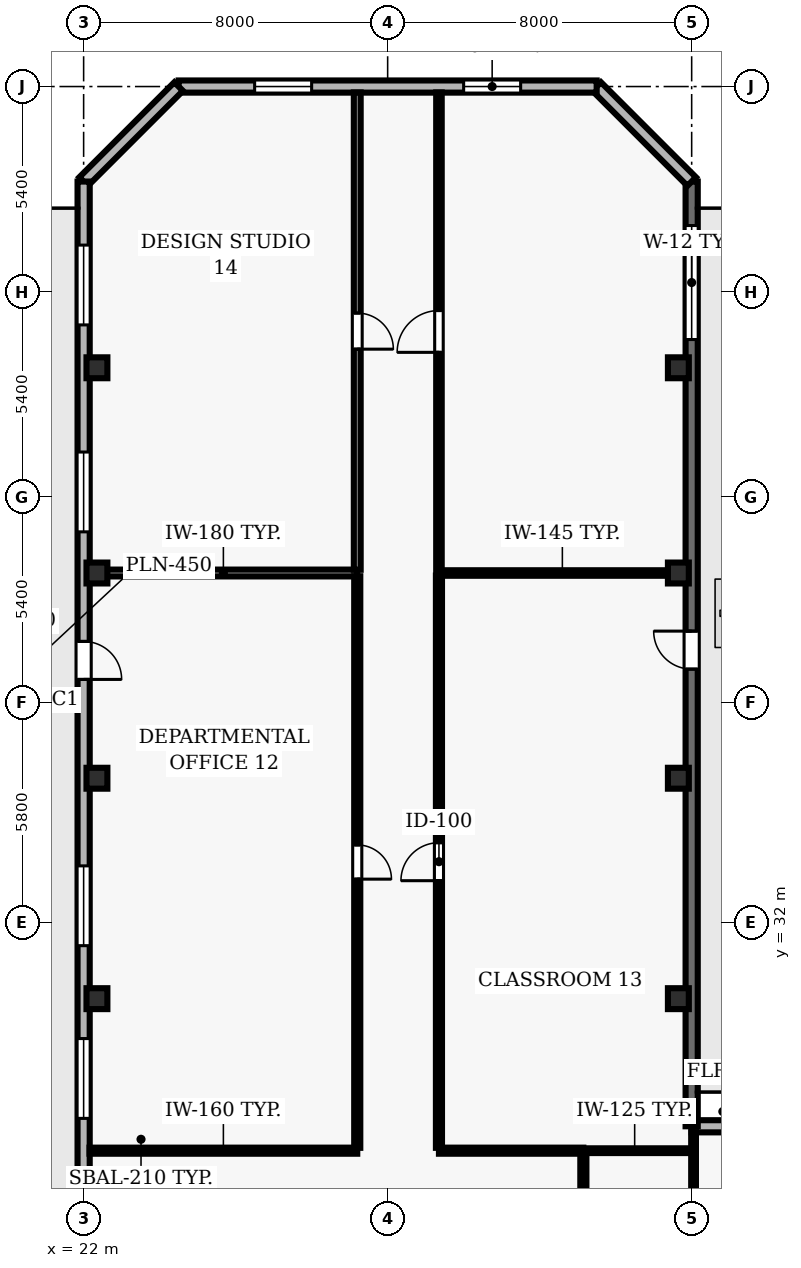
"""IFC4 building model, lengths in metres.
Left out: names, types, materials, properties, quantities, classifications, styles, units other than length and angle.
Written with IfcOpenShell. Run it as: python <this file> out.ifc"""

import sys

from ifc_helpers import new_model, si_unit, direction, frame, frame_2d, origin, origin_2d, place, context, subcontext, project, spatial, rectangle, hollow_rectangle, extrude, element, fill, save


model = new_model("IFC4")
c1 = context("Model", 3, precision=1e-05, world=origin(), true_north=direction((0.0, 1.0)))
c2 = subcontext(c1, "Body", "Model", "MODEL_VIEW")
j1 = project(units=[si_unit("LENGTHUNIT", "METRE"), si_unit("PLANEANGLEUNIT", "RADIAN")], contexts=[c1])
p1 = place(None, origin())
s1 = spatial("IfcSite", under=j1, at=p1, CompositionType="ELEMENT")
p2 = place(p1, origin())
s2 = spatial("IfcBuilding", under=s1, at=p2, CompositionType="ELEMENT")
p3 = place(p2, frame((0.0, 0.0, 66.1)))
s3 = spatial("IfcBuildingStorey", under=s2, at=p3, CompositionType="ELEMENT", Elevation=66.1)
for number, where, z_axis, x_axis in (
    (1, (22.35, 30.0, 0.0), (0.0, 0.0, 1.0), (1.0, 0.0, 0.0)),
    (2, (37.65, 30.0, 0.0), (0.0, 0.0, 1.0), (1.0, 0.0, 0.0)),
    (3, (22.35, 35.8, 0.0), (0.0, 0.0, 1.0), (1.0, 0.0, 0.0)),
    (4, (37.65, 35.8, 0.0), (0.0, 0.0, 1.0), (1.0, 0.0, 0.0)),
    (5, (22.35, 41.2, 0.0), (0.0, 0.0, 1.0), (1.0, 0.0, 0.0)),
    (6, (37.65, 41.2, 0.0), (0.0, 0.0, 1.0), (1.0, 0.0, 0.0)),
    (7, (22.35, 46.6, 0.0), (0.0, 0.0, 1.0), (1.0, 0.0, 0.0)),
    (8, (37.65, 46.6, 0.0), (0.0, 0.0, 1.0), (1.0, 0.0, 0.0)),
):
    element("IfcColumn", number, at=place(p3, frame(where, z_axis=z_axis, x_axis=x_axis)), inside=s3, PredefinedType="COLUMN", context=c2, shape_type="SweptSolid", body=[
        extrude(hollow_rectangle(XDim=0.55, YDim=0.55, WallThickness=0.025, at=origin_2d()), origin(), (0.0, 0.0, 1.0), 3.9),
    ])
p4 = place(p3, frame((49.95, 26.642, 0.0), z_axis=(0.0, 0.0, 1.0), x_axis=(-1.0, 0.0, 0.0)))
e9 = element("IfcWall", 9, at=p4, inside=s3, PredefinedType="SOLIDWALL", context=c2, shape_type="SweptSolid", body=[
    extrude(rectangle(XDim=11.95, YDim=0.32, at=frame_2d((5.975, 0.0))), origin(), (0.0, 0.0, 1.0), 3.69),
])
p5 = place(p4, frame((1.788, 0.0, 0.9)))
e10 = element("IfcOpeningElement", 10, at=p5, cuts=e9, PredefinedType="OPENING", context=c2, shape_type="SweptSolid", body=[
    extrude(rectangle(XDim=2.4, YDim=2.2, at=frame_2d((1.2, 1.1))), frame((0.0, 0.17, 0.0), z_axis=(0.0, -1.0, 0.0), x_axis=(1.0, 0.0, 0.0)), (0.0, 0.0, 1.0), 0.34),
])
p6 = place(p4, frame((7.763, 0.0, 0.9)))
e11 = element("IfcOpeningElement", 11, at=p6, cuts=e9, PredefinedType="OPENING", context=c2, shape_type="SweptSolid", body=[
    extrude(rectangle(XDim=2.4, YDim=2.2, at=frame_2d((1.2, 1.1))), frame((0.0, 0.17, 0.0), z_axis=(0.0, -1.0, 0.0), x_axis=(1.0, 0.0, 0.0)), (0.0, 0.0, 1.0), 0.34),
])
p7 = place(p3, frame((38.0, 26.642, 0.0), z_axis=(0.0, 0.0, 1.0), x_axis=(0.0, 1.0, 0.0)))
e12 = element("IfcWall", 12, at=p7, inside=s3, PredefinedType="SOLIDWALL", context=c2, shape_type="SweptSolid", body=[
    extrude(rectangle(XDim=24.858, YDim=0.32, at=frame_2d((12.429, 0.0))), origin(), (0.0, 0.0, 1.0), 3.69),
])
p8 = place(p7, frame((12.029, 0.0, 0.0)))
e13 = element("IfcOpeningElement", 13, at=p8, cuts=e12, PredefinedType="OPENING", context=c2, shape_type="SweptSolid", body=[
    extrude(rectangle(XDim=1.0, YDim=2.2, at=frame_2d((0.5, 1.1))), frame((0.0, 0.17, 0.0), z_axis=(0.0, -1.0, 0.0), x_axis=(1.0, 0.0, 0.0)), (0.0, 0.0, 1.0), 0.34),
])
p9 = place(p7, frame((20.701, 0.0, 0.9)))
e14 = element("IfcOpeningElement", 14, at=p9, cuts=e12, PredefinedType="OPENING", context=c2, shape_type="SweptSolid", body=[
    extrude(rectangle(XDim=3.0, YDim=2.2, at=frame_2d((1.5, 1.1))), frame((0.0, 0.17, 0.0), z_axis=(0.0, -1.0, 0.0), x_axis=(1.0, 0.0, 0.0)), (0.0, 0.0, 1.0), 0.34),
])
p10 = place(p3, frame((38.0, 51.5, 0.0), z_axis=(0.0, 0.0, 1.0), x_axis=(-0.707106781187, 0.707106781187, 0.0)))
e15 = element("IfcWall", 15, at=p10, inside=s3, PredefinedType="SOLIDWALL", context=c2, shape_type="SweptSolid", body=[
    extrude(rectangle(XDim=3.536, YDim=0.32, at=frame_2d((1.768, 0.0))), origin(), (0.0, 0.0, 1.0), 3.69),
])
p11 = place(p3, frame((35.5, 54.0, 0.0), z_axis=(0.0, 0.0, 1.0), x_axis=(-1.0, 0.0, 0.0)))
e16 = element("IfcWall", 16, at=p11, inside=s3, PredefinedType="SOLIDWALL", context=c2, shape_type="SweptSolid", body=[
    extrude(rectangle(XDim=11.0, YDim=0.32, at=frame_2d((5.5, 0.0))), origin(), (0.0, 0.0, 1.0), 3.69),
])
p12 = place(p11, frame((2.0, 0.0, 0.9)))
e17 = element("IfcOpeningElement", 17, at=p12, cuts=e16, PredefinedType="OPENING", context=c2, shape_type="SweptSolid", body=[
    extrude(rectangle(XDim=1.5, YDim=1.6, at=frame_2d((0.75, 0.8))), frame((0.0, 0.17, 0.0), z_axis=(0.0, -1.0, 0.0), x_axis=(1.0, 0.0, 0.0)), (0.0, 0.0, 1.0), 0.34),
])
p13 = place(p11, frame((7.5, 0.0, 0.9)))
e18 = element("IfcOpeningElement", 18, at=p13, cuts=e16, PredefinedType="OPENING", context=c2, shape_type="SweptSolid", body=[
    extrude(rectangle(XDim=1.5, YDim=1.6, at=frame_2d((0.75, 0.8))), frame((0.0, 0.17, 0.0), z_axis=(0.0, -1.0, 0.0), x_axis=(1.0, 0.0, 0.0)), (0.0, 0.0, 1.0), 0.34),
])
p14 = place(p3, frame((24.5, 54.0, 0.0), z_axis=(0.0, 0.0, 1.0), x_axis=(-0.707106781187, -0.707106781187, 0.0)))
e19 = element("IfcWall", 19, at=p14, inside=s3, PredefinedType="SOLIDWALL", context=c2, shape_type="SweptSolid", body=[
    extrude(rectangle(XDim=3.536, YDim=0.32, at=frame_2d((1.768, 0.0))), origin(), (0.0, 0.0, 1.0), 3.69),
])
p15 = place(p3, frame((22.0, 51.5, 0.0), z_axis=(0.0, 0.0, 1.0), x_axis=(0.0, -1.0, 0.0)))
e20 = element("IfcWall", 20, at=p15, inside=s3, PredefinedType="SOLIDWALL", context=c2, shape_type="SweptSolid", body=[
    extrude(rectangle(XDim=49.0, YDim=0.32, at=frame_2d((24.5, 0.0))), origin(), (0.0, 0.0, 1.0), 3.69),
])
p16 = place(p15, frame((12.1, 0.0, 0.0)))
e21 = element("IfcOpeningElement", 21, at=p16, cuts=e20, PredefinedType="OPENING", context=c2, shape_type="SweptSolid", body=[
    extrude(rectangle(XDim=1.0, YDim=2.2, at=frame_2d((0.5, 1.1))), frame((0.0, 0.17, 0.0), z_axis=(0.0, -1.0, 0.0), x_axis=(1.0, 0.0, 0.0)), (0.0, 0.0, 1.0), 0.34),
])
p17 = place(p15, frame((1.672, 0.0, 0.9)))
e22 = element("IfcOpeningElement", 22, at=p17, cuts=e20, PredefinedType="OPENING", context=c2, shape_type="SweptSolid", body=[
    extrude(rectangle(XDim=2.1, YDim=1.6, at=frame_2d((1.05, 0.8))), frame((0.0, 0.17, 0.0), z_axis=(0.0, -1.0, 0.0), x_axis=(1.0, 0.0, 0.0)), (0.0, 0.0, 1.0), 0.34),
])
p18 = place(p15, frame((7.117, 0.0, 0.9)))
e23 = element("IfcOpeningElement", 23, at=p18, cuts=e20, PredefinedType="OPENING", context=c2, shape_type="SweptSolid", body=[
    extrude(rectangle(XDim=2.1, YDim=1.6, at=frame_2d((1.05, 0.8))), frame((0.0, 0.17, 0.0), z_axis=(0.0, -1.0, 0.0), x_axis=(1.0, 0.0, 0.0)), (0.0, 0.0, 1.0), 0.34),
])
p19 = place(p15, frame((18.006, 0.0, 0.9)))
e24 = element("IfcOpeningElement", 24, at=p19, cuts=e20, PredefinedType="OPENING", context=c2, shape_type="SweptSolid", body=[
    extrude(rectangle(XDim=2.1, YDim=1.6, at=frame_2d((1.05, 0.8))), frame((0.0, 0.17, 0.0), z_axis=(0.0, -1.0, 0.0), x_axis=(1.0, 0.0, 0.0)), (0.0, 0.0, 1.0), 0.34),
])
p20 = place(p15, frame((22.55, 0.0, 0.9)))
e25 = element("IfcOpeningElement", 25, at=p20, cuts=e20, PredefinedType="OPENING", context=c2, shape_type="SweptSolid", body=[
    extrude(rectangle(XDim=2.1, YDim=1.6, at=frame_2d((1.05, 0.8))), frame((0.0, 0.17, 0.0), z_axis=(0.0, -1.0, 0.0), x_axis=(1.0, 0.0, 0.0)), (0.0, 0.0, 1.0), 0.34),
])
p21 = place(p15, frame((29.344, 0.0, 0.9)))
e26 = element("IfcOpeningElement", 26, at=p21, cuts=e20, PredefinedType="OPENING", context=c2, shape_type="SweptSolid", body=[
    extrude(rectangle(XDim=2.1, YDim=1.6, at=frame_2d((1.05, 0.8))), frame((0.0, 0.17, 0.0), z_axis=(0.0, -1.0, 0.0), x_axis=(1.0, 0.0, 0.0)), (0.0, 0.0, 1.0), 0.34),
])
p22 = place(p15, frame((33.889, 0.0, 0.9)))
e27 = element("IfcOpeningElement", 27, at=p22, cuts=e20, PredefinedType="OPENING", context=c2, shape_type="SweptSolid", body=[
    extrude(rectangle(XDim=2.1, YDim=1.6, at=frame_2d((1.05, 0.8))), frame((0.0, 0.17, 0.0), z_axis=(0.0, -1.0, 0.0), x_axis=(1.0, 0.0, 0.0)), (0.0, 0.0, 1.0), 0.34),
])
p23 = place(p15, frame((39.783, 0.0, 0.9)))
e28 = element("IfcOpeningElement", 28, at=p23, cuts=e20, PredefinedType="OPENING", context=c2, shape_type="SweptSolid", body=[
    extrude(rectangle(XDim=2.1, YDim=1.6, at=frame_2d((1.05, 0.8))), frame((0.0, 0.17, 0.0), z_axis=(0.0, -1.0, 0.0), x_axis=(1.0, 0.0, 0.0)), (0.0, 0.0, 1.0), 0.34),
])
p24 = place(p3, frame((29.2, 26.0, 0.0), z_axis=(0.0, 0.0, 1.0), x_axis=(-1.0, 0.0, 0.0)))
e29 = element("IfcWall", 29, at=p24, inside=s3, PredefinedType="PARTITIONING", context=c2, shape_type="SweptSolid", body=[
    extrude(rectangle(XDim=7.045, YDim=0.16, at=frame_2d((3.522, 0.0))), origin(), (0.0, 0.0, 1.0), 3.69),
])
p25 = place(p3, frame((29.2, 41.2, 0.0), z_axis=(0.0, 0.0, 1.0), x_axis=(-1.0, 0.0, 0.0)))
e30 = element("IfcWall", 30, at=p25, inside=s3, PredefinedType="PARTITIONING", context=c2, shape_type="SweptSolid", body=[
    extrude(rectangle(XDim=7.045, YDim=0.18, at=frame_2d((3.522, 0.0))), origin(), (0.0, 0.0, 1.0), 3.055),
])
p26 = place(p3, frame((35.15, 26.0, 0.0), z_axis=(0.0, 0.0, 1.0), x_axis=(-1.0, 0.0, 0.0)))
e31 = element("IfcWall", 31, at=p26, inside=s3, PredefinedType="PARTITIONING", context=c2, shape_type="SweptSolid", body=[
    extrude(rectangle(XDim=3.8, YDim=0.16, at=frame_2d((1.9, 0.0))), origin(), (0.0, 0.0, 1.0), 3.69),
])
p27 = place(p3, frame((35.15, 26.0, 0.0), z_axis=(0.0, 0.0, 1.0), x_axis=(1.0, 0.0, 0.0)))
e32 = element("IfcWall", 32, at=p27, inside=s3, PredefinedType="PARTITIONING", context=c2, shape_type="SweptSolid", body=[
    extrude(rectangle(XDim=2.7, YDim=0.125, at=frame_2d((1.35, 0.0))), origin(), (0.0, 0.0, 1.0), 3.69),
])
p28 = place(p3, frame((37.845, 41.2, 0.0), z_axis=(0.0, 0.0, 1.0), x_axis=(-1.0, 0.0, 0.0)))
e33 = element("IfcWall", 33, at=p28, inside=s3, PredefinedType="PARTITIONING", context=c2, shape_type="SweptSolid", body=[
    extrude(rectangle(XDim=6.495, YDim=0.145, at=frame_2d((3.248, 0.0))), origin(), (0.0, 0.0, 1.0), 3.055),
])
p29 = place(p3, frame((29.2, 41.115, 0.0), z_axis=(0.0, 0.0, 1.0), x_axis=(0.0, -1.0, 0.0)))
e34 = element("IfcWall", 34, at=p29, inside=s3, PredefinedType="PARTITIONING", context=c2, shape_type="SweptSolid", body=[
    extrude(rectangle(XDim=15.04, YDim=0.16, at=frame_2d((7.52, 0.0))), origin(), (0.0, 0.0, 1.0), 3.69),
])
p30 = place(p29, frame((7.07, 0.0, 0.0)))
e35 = element("IfcOpeningElement", 35, at=p30, cuts=e34, PredefinedType="OPENING", context=c2, shape_type="SweptSolid", body=[
    extrude(rectangle(XDim=0.9, YDim=2.1, at=frame_2d((0.45, 1.05))), frame((0.0, 0.09, 0.0), z_axis=(0.0, -1.0, 0.0), x_axis=(1.0, 0.0, 0.0)), (0.0, 0.0, 1.0), 0.18),
])
p31 = place(p3, frame((29.2, 53.845, 0.0), z_axis=(0.0, 0.0, 1.0), x_axis=(0.0, -1.0, 0.0)))
e36 = element("IfcWall", 36, at=p31, inside=s3, PredefinedType="PARTITIONING", context=c2, shape_type="SweptSolid", body=[
    extrude(rectangle(XDim=12.56, YDim=0.18, at=frame_2d((6.28, 0.0))), origin(), (0.0, 0.0, 1.0), 3.69),
])
p32 = place(p31, frame((5.805, 0.0, 0.0)))
e37 = element("IfcOpeningElement", 37, at=p32, cuts=e36, PredefinedType="OPENING", context=c2, shape_type="SweptSolid", body=[
    extrude(rectangle(XDim=0.95, YDim=2.1, at=frame_2d((0.475, 1.05))), frame((0.0, 0.1, 0.0), z_axis=(0.0, -1.0, 0.0), x_axis=(1.0, 0.0, 0.0)), (0.0, 0.0, 1.0), 0.2),
])
p33 = place(p3, frame((31.35, 26.075, 0.0), z_axis=(0.0, 0.0, 1.0), x_axis=(0.0, 1.0, 0.0)))
e38 = element("IfcWall", 38, at=p33, inside=s3, PredefinedType="PARTITIONING", context=c2, shape_type="SweptSolid", body=[
    extrude(rectangle(XDim=15.058, YDim=0.16, at=frame_2d((7.529, 0.0))), origin(), (0.0, 0.0, 1.0), 3.69),
])
p34 = place(p33, frame((7.029, 0.0, 0.0)))
e39 = element("IfcOpeningElement", 39, at=p34, cuts=e38, PredefinedType="OPENING", context=c2, shape_type="SweptSolid", body=[
    extrude(rectangle(XDim=1.0, YDim=2.1, at=frame_2d((0.5, 1.05))), frame((0.0, 0.09, 0.0), z_axis=(0.0, -1.0, 0.0), x_axis=(1.0, 0.0, 0.0)), (0.0, 0.0, 1.0), 0.18),
])
p35 = place(p3, frame((31.35, 41.268, 0.0), z_axis=(0.0, 0.0, 1.0), x_axis=(0.0, 1.0, 0.0)))
e40 = element("IfcWall", 40, at=p35, inside=s3, PredefinedType="PARTITIONING", context=c2, shape_type="SweptSolid", body=[
    extrude(rectangle(XDim=12.577, YDim=0.145, at=frame_2d((6.289, 0.0))), origin(), (0.0, 0.0, 1.0), 3.69),
])
p36 = place(p35, frame((5.738, 0.0, 0.0)))
e41 = element("IfcOpeningElement", 41, at=p36, cuts=e40, PredefinedType="OPENING", context=c2, shape_type="SweptSolid", body=[
    extrude(rectangle(XDim=1.1, YDim=2.15, at=frame_2d((0.55, 1.075))), frame((0.0, 0.083, 0.0), z_axis=(0.0, -1.0, 0.0), x_axis=(1.0, 0.0, 0.0)), (0.0, 0.0, 1.0), 0.165),
])
p37 = place(p3, frame((35.15, 24.07, 0.0), z_axis=(0.0, 0.0, 1.0), x_axis=(0.0, 1.0, 0.0)))
e42 = element("IfcWall", 42, at=p37, inside=s3, PredefinedType="PARTITIONING", context=c2, shape_type="SweptSolid", body=[
    extrude(rectangle(XDim=1.855, YDim=0.16, at=frame_2d((0.927, 0.0))), origin(), (0.0, 0.0, 1.0), 3.69),
])
p38 = place(p3, frame((38.05, 26.487, 0.0), z_axis=(0.0, 0.0, 1.0), x_axis=(0.0, -1.0, 0.0)))
e43 = element("IfcWall", 43, at=p38, inside=s3, PredefinedType="PARTITIONING", context=c2, shape_type="SweptSolid", body=[
    extrude(rectangle(XDim=2.437, YDim=0.125, at=frame_2d((1.219, 0.0))), origin(), (0.0, 0.0, 1.0), 3.055),
])
p39 = place(p8, origin())
e44 = element("IfcDoor", 44, at=p39, inside=s3, OperationType="SINGLE_SWING_RIGHT", PredefinedType="DOOR", context=c2, shape_type="SweptSolid", body=[
    extrude(rectangle(XDim=1.0, YDim=2.2, at=frame_2d((0.5, 1.1))), frame((0.0, 0.025, 0.0), z_axis=(0.0, -1.0, 0.0), x_axis=(1.0, 0.0, 0.0)), (0.0, 0.0, 1.0), 0.05),
])
fill(e13, e44)
p40 = place(p9, origin())
e45 = element("IfcWindow", 45, at=p40, inside=s3, PartitioningType="SINGLE_PANEL", PredefinedType="WINDOW", context=c2, shape_type="SweptSolid", body=[
    extrude(rectangle(XDim=3.0, YDim=2.2, at=frame_2d((1.5, 1.1))), frame((0.0, 0.03, 0.0), z_axis=(0.0, -1.0, 0.0), x_axis=(1.0, 0.0, 0.0)), (0.0, 0.0, 1.0), 0.06),
])
fill(e14, e45)
p41 = place(p12, origin())
e46 = element("IfcWindow", 46, at=p41, inside=s3, PartitioningType="SINGLE_PANEL", PredefinedType="WINDOW", context=c2, shape_type="SweptSolid", body=[
    extrude(rectangle(XDim=1.5, YDim=1.6, at=frame_2d((0.75, 0.8))), frame((0.0, 0.03, 0.0), z_axis=(0.0, -1.0, 0.0), x_axis=(1.0, 0.0, 0.0)), (0.0, 0.0, 1.0), 0.06),
])
fill(e17, e46)
p42 = place(p13, origin())
e47 = element("IfcWindow", 47, at=p42, inside=s3, PartitioningType="SINGLE_PANEL", PredefinedType="WINDOW", context=c2, shape_type="SweptSolid", body=[
    extrude(rectangle(XDim=1.5, YDim=1.6, at=frame_2d((0.75, 0.8))), frame((0.0, 0.03, 0.0), z_axis=(0.0, -1.0, 0.0), x_axis=(1.0, 0.0, 0.0)), (0.0, 0.0, 1.0), 0.06),
])
fill(e18, e47)
p43 = place(p16, origin())
e48 = element("IfcDoor", 48, at=p43, inside=s3, OperationType="SINGLE_SWING_RIGHT", PredefinedType="DOOR", context=c2, shape_type="SweptSolid", body=[
    extrude(rectangle(XDim=1.0, YDim=2.2, at=frame_2d((0.5, 1.1))), frame((0.0, 0.025, 0.0), z_axis=(0.0, -1.0, 0.0), x_axis=(1.0, 0.0, 0.0)), (0.0, 0.0, 1.0), 0.05),
])
fill(e21, e48)
p44 = place(p17, origin())
e49 = element("IfcWindow", 49, at=p44, inside=s3, PartitioningType="SINGLE_PANEL", PredefinedType="WINDOW", context=c2, shape_type="SweptSolid", body=[
    extrude(rectangle(XDim=2.1, YDim=1.6, at=frame_2d((1.05, 0.8))), frame((0.0, 0.03, 0.0), z_axis=(0.0, -1.0, 0.0), x_axis=(1.0, 0.0, 0.0)), (0.0, 0.0, 1.0), 0.06),
])
fill(e22, e49)
p45 = place(p18, origin())
e50 = element("IfcWindow", 50, at=p45, inside=s3, PartitioningType="SINGLE_PANEL", PredefinedType="WINDOW", context=c2, shape_type="SweptSolid", body=[
    extrude(rectangle(XDim=2.1, YDim=1.6, at=frame_2d((1.05, 0.8))), frame((0.0, 0.03, 0.0), z_axis=(0.0, -1.0, 0.0), x_axis=(1.0, 0.0, 0.0)), (0.0, 0.0, 1.0), 0.06),
])
fill(e23, e50)
p46 = place(p19, origin())
e51 = element("IfcWindow", 51, at=p46, inside=s3, PartitioningType="SINGLE_PANEL", PredefinedType="WINDOW", context=c2, shape_type="SweptSolid", body=[
    extrude(rectangle(XDim=2.1, YDim=1.6, at=frame_2d((1.05, 0.8))), frame((0.0, 0.03, 0.0), z_axis=(0.0, -1.0, 0.0), x_axis=(1.0, 0.0, 0.0)), (0.0, 0.0, 1.0), 0.06),
])
fill(e24, e51)
p47 = place(p20, origin())
e52 = element("IfcWindow", 52, at=p47, inside=s3, PartitioningType="SINGLE_PANEL", PredefinedType="WINDOW", context=c2, shape_type="SweptSolid", body=[
    extrude(rectangle(XDim=2.1, YDim=1.6, at=frame_2d((1.05, 0.8))), frame((0.0, 0.03, 0.0), z_axis=(0.0, -1.0, 0.0), x_axis=(1.0, 0.0, 0.0)), (0.0, 0.0, 1.0), 0.06),
])
fill(e25, e52)
p48 = place(p30, origin())
e53 = element("IfcDoor", 53, at=p48, inside=s3, OperationType="SINGLE_SWING_RIGHT", PredefinedType="DOOR", context=c2, shape_type="SweptSolid", body=[
    extrude(rectangle(XDim=0.9, YDim=2.1, at=frame_2d((0.45, 1.05))), frame((0.0, 0.025, 0.0), z_axis=(0.0, -1.0, 0.0), x_axis=(1.0, 0.0, 0.0)), (0.0, 0.0, 1.0), 0.05),
])
fill(e35, e53)
p49 = place(p34, origin())
e54 = element("IfcDoor", 54, at=p49, inside=s3, OperationType="SINGLE_SWING_LEFT", PredefinedType="DOOR", context=c2, shape_type="SweptSolid", body=[
    extrude(rectangle(XDim=1.0, YDim=2.1, at=frame_2d((0.5, 1.05))), frame((0.0, 0.025, 0.0), z_axis=(0.0, -1.0, 0.0), x_axis=(1.0, 0.0, 0.0)), (0.0, 0.0, 1.0), 0.05),
])
fill(e39, e54)
p50 = place(p32, origin())
e55 = element("IfcDoor", 55, at=p50, inside=s3, OperationType="SINGLE_SWING_RIGHT", PredefinedType="DOOR", context=c2, shape_type="SweptSolid", body=[
    extrude(rectangle(XDim=0.95, YDim=2.1, at=frame_2d((0.475, 1.05))), frame((0.0, 0.025, 0.0), z_axis=(0.0, -1.0, 0.0), x_axis=(1.0, 0.0, 0.0)), (0.0, 0.0, 1.0), 0.05),
])
fill(e37, e55)
p51 = place(p36, origin())
e56 = element("IfcDoor", 56, at=p51, inside=s3, OperationType="SINGLE_SWING_LEFT", PredefinedType="DOOR", context=c2, shape_type="SweptSolid", body=[
    extrude(rectangle(XDim=1.1, YDim=2.15, at=frame_2d((0.55, 1.075))), frame((0.0, 0.025, 0.0), z_axis=(0.0, -1.0, 0.0), x_axis=(1.0, 0.0, 0.0)), (0.0, 0.0, 1.0), 0.05),
])
fill(e41, e56)
save(model, sys.argv[1])
